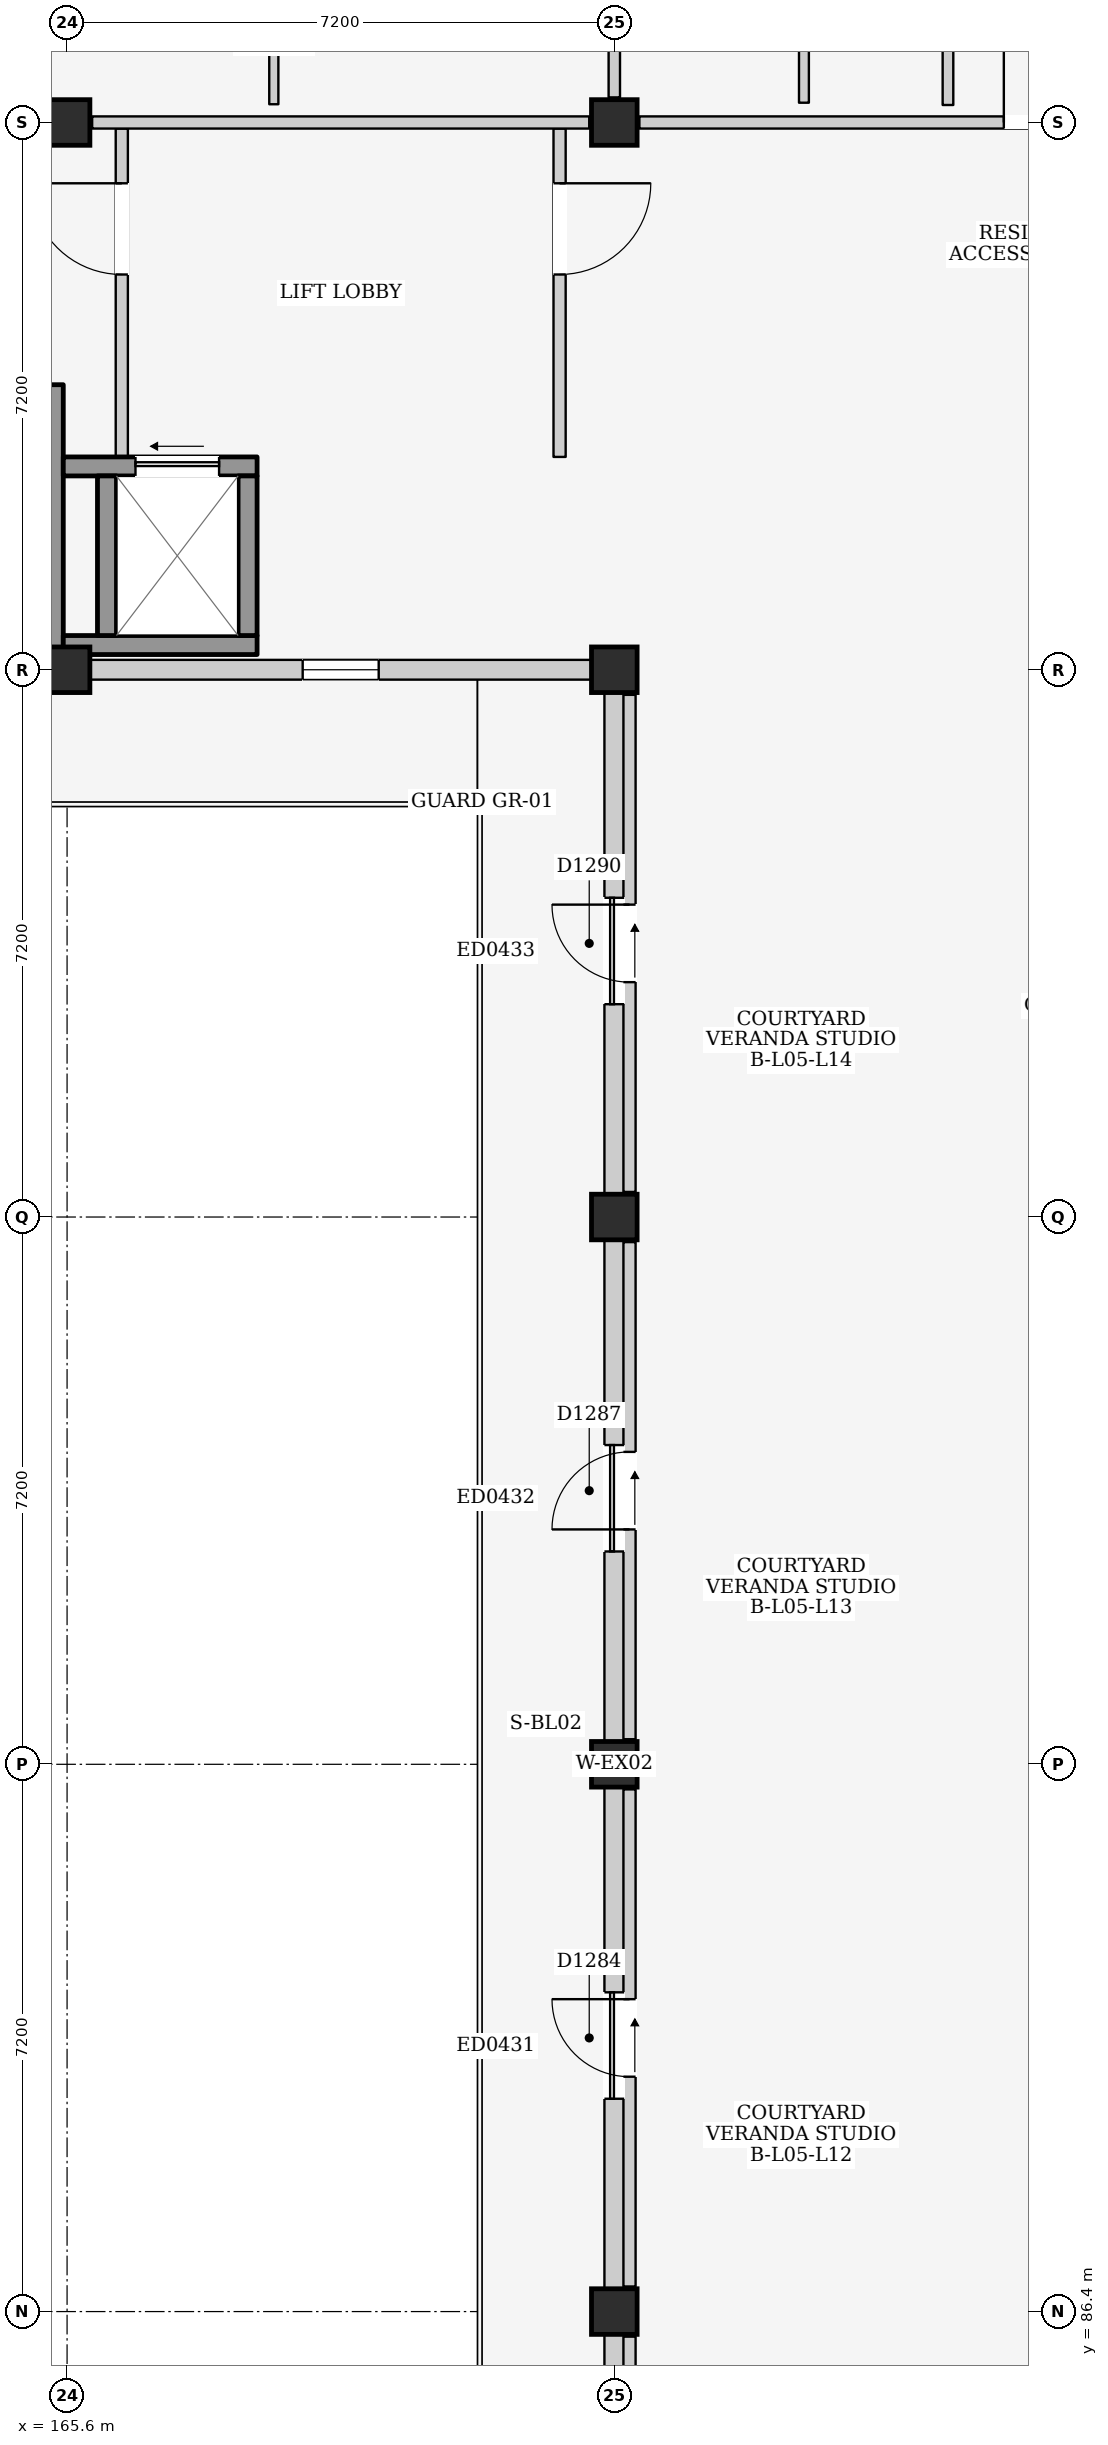
"""IFC4 building model, lengths in metres.
Left out: names, types, materials, properties, quantities, classifications, styles, units other than length and angle.
Written with IfcOpenShell. Run it as: python <this file> out.ifc"""

import sys

from ifc_helpers import new_model, si_unit, direction, frame, frame_2d, origin, origin_2d, place, context, subcontext, project, spatial, rectangle, extrude, element, fill, save


model = new_model("IFC4")
c1 = context("Model", 3, precision=1e-05, world=origin(), true_north=direction((0.0, 1.0)))
c2 = subcontext(c1, "Body", "Model", "MODEL_VIEW")
j1 = project(units=[si_unit("LENGTHUNIT", "METRE"), si_unit("PLANEANGLEUNIT", "RADIAN")], contexts=[c1])
p1 = place(None, origin())
s1 = spatial("IfcSite", under=j1, at=p1, CompositionType="ELEMENT")
p2 = place(p1, origin())
s2 = spatial("IfcBuilding", under=s1, at=p2, CompositionType="ELEMENT")
p3 = place(p2, frame((0.0, 0.0, 18.6)))
s3 = spatial("IfcBuildingStorey", under=s2, at=p3, CompositionType="ELEMENT", Elevation=18.6)
for number, where, z_axis, x_axis in (
    (1, (165.6, 108.0, 0.0), (0.0, 0.0, 1.0), (1.0, 0.0, 0.0)),
    (2, (165.6, 115.2, 0.0), (0.0, 0.0, 1.0), (1.0, 0.0, 0.0)),
    (3, (172.8, 86.4, 0.0), (0.0, 0.0, 1.0), (1.0, 0.0, 0.0)),
    (4, (172.8, 93.6, 0.0), (0.0, 0.0, 1.0), (1.0, 0.0, 0.0)),
    (5, (172.8, 100.8, 0.0), (0.0, 0.0, 1.0), (1.0, 0.0, 0.0)),
    (6, (172.8, 108.0, 0.0), (0.0, 0.0, 1.0), (1.0, 0.0, 0.0)),
    (7, (172.8, 115.2, 0.0), (0.0, 0.0, 1.0), (1.0, 0.0, 0.0)),
):
    element("IfcColumn", number, at=place(p3, frame(where, z_axis=z_axis, x_axis=x_axis)), inside=s3, PredefinedType="COLUMN", context=c2, shape_type="SweptSolid", body=[
        extrude(rectangle(XDim=0.6, YDim=0.6, at=origin_2d()), origin(), (0.0, 0.0, 1.0), 3.3),
    ])
p4 = place(p3, frame((165.9, 108.0, 0.0), z_axis=(0.0, 0.0, 1.0), x_axis=(1.0, 0.0, 0.0)))
e8 = element("IfcWall", 8, at=p4, inside=s3, PredefinedType="ELEMENTEDWALL", context=c2, shape_type="SweptSolid", body=[
    extrude(rectangle(XDim=6.6, YDim=0.26, at=frame_2d((3.3, 0.0))), origin(), (0.0, 0.0, 1.0), 2.445),
])
p5 = place(p4, frame((2.8, 0.0, 1.2)))
e9 = element("IfcOpeningElement", 9, at=p5, cuts=e8, PredefinedType="OPENING", context=c2, shape_type="SweptSolid", body=[
    extrude(rectangle(XDim=1.0, YDim=0.9, at=frame_2d((0.5, 0.45))), frame((0.0, 0.145, 0.0), z_axis=(0.0, -1.0, 0.0), x_axis=(1.0, 0.0, 0.0)), (0.0, 0.0, 1.0), 0.29),
])
p6 = place(p3, frame((172.8, 79.5, 0.0), z_axis=(0.0, 0.0, 1.0), x_axis=(0.0, 1.0, 0.0)))
e10 = element("IfcWall", 10, at=p6, inside=s3, PredefinedType="ELEMENTEDWALL", context=c2, shape_type="SweptSolid", body=[
    extrude(rectangle(XDim=6.6, YDim=0.26, at=frame_2d((3.3, 0.0))), origin(), (0.0, 0.0, 1.0), 2.545),
])
p7 = place(p6, frame((2.5, 0.0, 0.0)))
e11 = element("IfcOpeningElement", 11, at=p7, cuts=e10, PredefinedType="OPENING", context=c2, shape_type="SweptSolid", body=[
    extrude(rectangle(XDim=1.4, YDim=2.1, at=frame_2d((0.7, 1.05))), frame((0.0, 0.145, 0.0), z_axis=(0.0, -1.0, 0.0), x_axis=(1.0, 0.0, 0.0)), (0.0, 0.0, 1.0), 0.29),
])
p8 = place(p3, frame((172.8, 86.7, 0.0), z_axis=(0.0, 0.0, 1.0), x_axis=(0.0, 1.0, 0.0)))
e12 = element("IfcWall", 12, at=p8, inside=s3, PredefinedType="ELEMENTEDWALL", context=c2, shape_type="SweptSolid", body=[
    extrude(rectangle(XDim=6.6, YDim=0.26, at=frame_2d((3.3, 0.0))), origin(), (0.0, 0.0, 1.0), 2.545),
])
p9 = place(p8, frame((2.5, 0.0, 0.0)))
e13 = element("IfcOpeningElement", 13, at=p9, cuts=e12, PredefinedType="OPENING", context=c2, shape_type="SweptSolid", body=[
    extrude(rectangle(XDim=1.4, YDim=2.1, at=frame_2d((0.7, 1.05))), frame((0.0, 0.145, 0.0), z_axis=(0.0, -1.0, 0.0), x_axis=(1.0, 0.0, 0.0)), (0.0, 0.0, 1.0), 0.29),
])
p10 = place(p3, frame((172.8, 93.9, 0.0), z_axis=(0.0, 0.0, 1.0), x_axis=(0.0, 1.0, 0.0)))
e14 = element("IfcWall", 14, at=p10, inside=s3, PredefinedType="ELEMENTEDWALL", context=c2, shape_type="SweptSolid", body=[
    extrude(rectangle(XDim=6.6, YDim=0.26, at=frame_2d((3.3, 0.0))), origin(), (0.0, 0.0, 1.0), 2.545),
])
p11 = place(p10, frame((2.5, 0.0, 0.0)))
e15 = element("IfcOpeningElement", 15, at=p11, cuts=e14, PredefinedType="OPENING", context=c2, shape_type="SweptSolid", body=[
    extrude(rectangle(XDim=1.4, YDim=2.1, at=frame_2d((0.7, 1.05))), frame((0.0, 0.145, 0.0), z_axis=(0.0, -1.0, 0.0), x_axis=(1.0, 0.0, 0.0)), (0.0, 0.0, 1.0), 0.29),
])
p12 = place(p3, frame((172.8, 101.1, 0.0), z_axis=(0.0, 0.0, 1.0), x_axis=(0.0, 1.0, 0.0)))
e16 = element("IfcWall", 16, at=p12, inside=s3, PredefinedType="ELEMENTEDWALL", context=c2, shape_type="SweptSolid", body=[
    extrude(rectangle(XDim=6.6, YDim=0.26, at=frame_2d((3.3, 0.0))), origin(), (0.0, 0.0, 1.0), 2.545),
])
p13 = place(p12, frame((2.5, 0.0, 0.0)))
e17 = element("IfcOpeningElement", 17, at=p13, cuts=e16, PredefinedType="OPENING", context=c2, shape_type="SweptSolid", body=[
    extrude(rectangle(XDim=1.4, YDim=2.1, at=frame_2d((0.7, 1.05))), frame((0.0, 0.145, 0.0), z_axis=(0.0, -1.0, 0.0), x_axis=(1.0, 0.0, 0.0)), (0.0, 0.0, 1.0), 0.29),
])
p14 = place(p3, frame((165.4, 108.15, 0.0), z_axis=(0.0, 0.0, 1.0), x_axis=(0.0, 1.0, 0.0)))
e18 = element("IfcWall", 18, at=p14, inside=s3, PredefinedType="SHEAR", context=c2, shape_type="SweptSolid", body=[
    extrude(rectangle(XDim=3.6, YDim=0.3, at=frame_2d((1.8, 0.0))), origin(), (0.0, 0.0, 1.0), 3.06),
])
p15 = place(p3, frame((166.32, 110.8, 0.0), z_axis=(0.0, 0.0, 1.0), x_axis=(0.0, 1.0, 0.0)))
e19 = element("IfcWall", 19, at=p15, inside=s3, PredefinedType="PARTITIONING", context=c2, shape_type="SweptSolid", body=[
    extrude(rectangle(XDim=4.32, YDim=0.16, at=frame_2d((2.16, 0.0))), origin(), (0.0, 0.0, 1.0), 3.06),
])
p16 = place(p15, frame((2.4, 0.0, 0.0)))
e20 = element("IfcOpeningElement", 20, at=p16, cuts=e19, PredefinedType="OPENING", context=c2, shape_type="SweptSolid", body=[
    extrude(rectangle(XDim=1.2, YDim=2.2, at=frame_2d((0.6, 1.1))), frame((0.0, 0.095, 0.0), z_axis=(0.0, -1.0, 0.0), x_axis=(1.0, 0.0, 0.0)), (0.0, 0.0, 1.0), 0.19),
])
p17 = place(p3, frame((172.08, 110.8, 0.0), z_axis=(0.0, 0.0, 1.0), x_axis=(0.0, 1.0, 0.0)))
e21 = element("IfcWall", 21, at=p17, inside=s3, PredefinedType="PARTITIONING", context=c2, shape_type="SweptSolid", body=[
    extrude(rectangle(XDim=4.32, YDim=0.16, at=frame_2d((2.16, 0.0))), origin(), (0.0, 0.0, 1.0), 3.06),
])
p18 = place(p17, frame((2.4, 0.0, 0.0)))
e22 = element("IfcOpeningElement", 22, at=p18, cuts=e21, PredefinedType="OPENING", context=c2, shape_type="SweptSolid", body=[
    extrude(rectangle(XDim=1.2, YDim=2.2, at=frame_2d((0.6, 1.1))), frame((0.0, 0.095, 0.0), z_axis=(0.0, -1.0, 0.0), x_axis=(1.0, 0.0, 0.0)), (0.0, 0.0, 1.0), 0.19),
])
p19 = place(p3, frame((165.55, 108.325, 0.0), z_axis=(0.0, 0.0, 1.0), x_axis=(1.0, 0.0, 0.0)))
e23 = element("IfcWall", 23, at=p19, inside=s3, PredefinedType="SHEAR", context=c2, shape_type="SweptSolid", body=[
    extrude(rectangle(XDim=2.55, YDim=0.25, at=frame_2d((1.275, 0.0))), origin(), (0.0, 0.0, 1.0), 3.06),
])
p20 = place(p3, frame((165.55, 110.675, 0.0), z_axis=(0.0, 0.0, 1.0), x_axis=(1.0, 0.0, 0.0)))
e24 = element("IfcWall", 24, at=p20, inside=s3, PredefinedType="SHEAR", context=c2, shape_type="SweptSolid", body=[
    extrude(rectangle(XDim=2.55, YDim=0.25, at=frame_2d((1.275, 0.0))), origin(), (0.0, 0.0, 1.0), 3.06),
])
p21 = place(p20, frame((0.95, 0.0, 0.0)))
e25 = element("IfcOpeningElement", 25, at=p21, cuts=e24, PredefinedType="OPENING", context=c2, shape_type="SweptSolid", body=[
    extrude(rectangle(XDim=1.1, YDim=2.15, at=frame_2d((0.55, 1.075))), frame((0.0, 0.14, 0.0), z_axis=(0.0, -1.0, 0.0), x_axis=(1.0, 0.0, 0.0)), (0.0, 0.0, 1.0), 0.28),
])
for number, where, z_axis, x_axis in (
    (26, (166.125, 108.45, 0.0), (0.0, 0.0, 1.0), (0.0, 1.0, 0.0)),
    (27, (167.975, 108.45, 0.0), (0.0, 0.0, 1.0), (0.0, 1.0, 0.0)),
):
    element("IfcWall", number, at=place(p3, frame(where, z_axis=z_axis, x_axis=x_axis)), inside=s3, PredefinedType="SHEAR", context=c2, shape_type="SweptSolid", body=[
        extrude(rectangle(XDim=2.1, YDim=0.25, at=frame_2d((1.05, 0.0))), origin(), (0.0, 0.0, 1.0), 3.06),
    ])
p22 = place(p3, frame((165.93, 115.2, 0.0), z_axis=(0.0, 0.0, 1.0), x_axis=(1.0, 0.0, 0.0)))
e28 = element("IfcWall", 28, at=p22, inside=s3, PredefinedType="PARTITIONING", context=c2, shape_type="SweptSolid", body=[
    extrude(rectangle(XDim=6.54, YDim=0.16, at=frame_2d((3.27, 0.0))), origin(), (0.0, 0.0, 1.0), 2.445),
])
p23 = place(p3, frame((172.8, 115.53, 0.0), z_axis=(0.0, 0.0, 1.0), x_axis=(0.0, 1.0, 0.0)))
e29 = element("IfcWall", 29, at=p23, inside=s3, PredefinedType="PARTITIONING", context=c2, shape_type="SweptSolid", body=[
    extrude(rectangle(XDim=6.54, YDim=0.15, at=frame_2d((3.27, 0.0))), origin(), (0.0, 0.0, 1.0), 2.545),
])
p24 = place(p3, frame((168.32, 115.44, 0.0), z_axis=(0.0, 0.0, 1.0), x_axis=(0.0, 1.0, 0.0)))
e30 = element("IfcWall", 30, at=p24, inside=s3, PredefinedType="PARTITIONING", context=c2, shape_type="SweptSolid", body=[
    extrude(rectangle(XDim=3.04, YDim=0.12, at=frame_2d((1.52, 0.0))), origin(), (0.0, 0.0, 1.0), 3.06),
])
p25 = place(p24, frame((1.04, 0.0, 0.0)))
e31 = element("IfcOpeningElement", 31, at=p25, cuts=e30, PredefinedType="OPENING", context=c2, shape_type="SweptSolid", body=[
    extrude(rectangle(XDim=0.96, YDim=2.15, at=frame_2d((0.48, 1.075))), frame((0.0, 0.075, 0.0), z_axis=(0.0, -1.0, 0.0), x_axis=(1.0, 0.0, 0.0)), (0.0, 0.0, 1.0), 0.15),
])
p26 = place(p3, frame((173.13, 115.2, 0.0), z_axis=(0.0, 0.0, 1.0), x_axis=(1.0, 0.0, 0.0)))
e32 = element("IfcWall", 32, at=p26, inside=s3, PredefinedType="PARTITIONING", context=c2, shape_type="SweptSolid", body=[
    extrude(rectangle(XDim=6.54, YDim=0.16, at=frame_2d((3.27, 0.0))), origin(), (0.0, 0.0, 1.0), 2.445),
])
p27 = place(p26, frame((4.795, 0.0, 0.0)))
e33 = element("IfcOpeningElement", 33, at=p27, cuts=e32, PredefinedType="OPENING", context=c2, shape_type="SweptSolid", body=[
    extrude(rectangle(XDim=1.05, YDim=2.15, at=frame_2d((0.525, 1.075))), frame((0.0, 0.095, 0.0), z_axis=(0.0, -1.0, 0.0), x_axis=(1.0, 0.0, 0.0)), (0.0, 0.0, 1.0), 0.19),
])
p28 = place(p3, frame((175.295, 115.46, 0.0), z_axis=(0.0, 0.0, 1.0), x_axis=(0.0, 1.0, 0.0)))
e34 = element("IfcWall", 34, at=p28, inside=s3, PredefinedType="PARTITIONING", context=c2, shape_type="SweptSolid", body=[
    extrude(rectangle(XDim=2.33, YDim=0.13, at=frame_2d((1.165, 0.0))), origin(), (0.0, 0.0, 1.0), 3.06),
])
p29 = place(p3, frame((177.19, 115.43, 0.0), z_axis=(0.0, 0.0, 1.0), x_axis=(0.0, 1.0, 0.0)))
e35 = element("IfcWall", 35, at=p29, inside=s3, PredefinedType="PARTITIONING", context=c2, shape_type="SweptSolid", body=[
    extrude(rectangle(XDim=2.35, YDim=0.14, at=frame_2d((1.175, 0.0))), origin(), (0.0, 0.0, 1.0), 3.06),
])
p30 = place(p3, frame((173.0, 79.53, 0.0), z_axis=(0.0, 0.0, 1.0), x_axis=(0.0, 1.0, 0.0)))
e36 = element("IfcWall", 36, at=p30, inside=s3, PredefinedType="PARTITIONING", context=c2, shape_type="SweptSolid", body=[
    extrude(rectangle(XDim=6.54, YDim=0.16, at=frame_2d((3.27, 0.0))), origin(), (0.0, 0.0, 1.0), 3.06),
])
p31 = place(p30, frame((2.76, 0.0, 0.0)))
e37 = element("IfcOpeningElement", 37, at=p31, cuts=e36, PredefinedType="OPENING", context=c2, shape_type="SweptSolid", body=[
    extrude(rectangle(XDim=1.02, YDim=2.18, at=frame_2d((0.51, 1.09))), frame((0.0, 0.095, 0.0), z_axis=(0.0, -1.0, 0.0), x_axis=(1.0, 0.0, 0.0)), (0.0, 0.0, 1.0), 0.19),
])
p32 = place(p3, frame((173.0, 86.73, 0.0), z_axis=(0.0, 0.0, 1.0), x_axis=(0.0, 1.0, 0.0)))
e38 = element("IfcWall", 38, at=p32, inside=s3, PredefinedType="PARTITIONING", context=c2, shape_type="SweptSolid", body=[
    extrude(rectangle(XDim=6.54, YDim=0.16, at=frame_2d((3.27, 0.0))), origin(), (0.0, 0.0, 1.0), 3.06),
])
p33 = place(p32, frame((2.76, 0.0, 0.0)))
e39 = element("IfcOpeningElement", 39, at=p33, cuts=e38, PredefinedType="OPENING", context=c2, shape_type="SweptSolid", body=[
    extrude(rectangle(XDim=1.02, YDim=2.18, at=frame_2d((0.51, 1.09))), frame((0.0, 0.095, 0.0), z_axis=(0.0, -1.0, 0.0), x_axis=(1.0, 0.0, 0.0)), (0.0, 0.0, 1.0), 0.19),
])
p34 = place(p3, frame((173.0, 93.93, 0.0), z_axis=(0.0, 0.0, 1.0), x_axis=(0.0, 1.0, 0.0)))
e40 = element("IfcWall", 40, at=p34, inside=s3, PredefinedType="PARTITIONING", context=c2, shape_type="SweptSolid", body=[
    extrude(rectangle(XDim=6.54, YDim=0.16, at=frame_2d((3.27, 0.0))), origin(), (0.0, 0.0, 1.0), 3.06),
])
p35 = place(p34, frame((2.76, 0.0, 0.0)))
e41 = element("IfcOpeningElement", 41, at=p35, cuts=e40, PredefinedType="OPENING", context=c2, shape_type="SweptSolid", body=[
    extrude(rectangle(XDim=1.02, YDim=2.18, at=frame_2d((0.51, 1.09))), frame((0.0, 0.095, 0.0), z_axis=(0.0, -1.0, 0.0), x_axis=(1.0, 0.0, 0.0)), (0.0, 0.0, 1.0), 0.19),
])
p36 = place(p3, frame((173.0, 101.13, 0.0), z_axis=(0.0, 0.0, 1.0), x_axis=(0.0, 1.0, 0.0)))
e42 = element("IfcWall", 42, at=p36, inside=s3, PredefinedType="PARTITIONING", context=c2, shape_type="SweptSolid", body=[
    extrude(rectangle(XDim=6.54, YDim=0.16, at=frame_2d((3.27, 0.0))), origin(), (0.0, 0.0, 1.0), 3.06),
])
p37 = place(p36, frame((2.76, 0.0, 0.0)))
e43 = element("IfcOpeningElement", 43, at=p37, cuts=e42, PredefinedType="OPENING", context=c2, shape_type="SweptSolid", body=[
    extrude(rectangle(XDim=1.02, YDim=2.18, at=frame_2d((0.51, 1.09))), frame((0.0, 0.095, 0.0), z_axis=(0.0, -1.0, 0.0), x_axis=(1.0, 0.0, 0.0)), (0.0, 0.0, 1.0), 0.19),
])
p38 = place(p5, origin())
e44 = element("IfcWindow", 44, at=p38, inside=s3, PartitioningType="SINGLE_PANEL", PredefinedType="WINDOW", context=c2, shape_type="SweptSolid", body=[
    extrude(rectangle(XDim=1.0, YDim=0.9, at=frame_2d((0.5, 0.45))), frame((0.0, 0.03, 0.0), z_axis=(0.0, -1.0, 0.0), x_axis=(1.0, 0.0, 0.0)), (0.0, 0.0, 1.0), 0.06),
])
fill(e9, e44)
p39 = place(p9, frame((1.4, 0.0, 0.0), z_axis=(0.0, 0.0, 1.0), x_axis=(-1.0, 0.0, 0.0)))
e45 = element("IfcDoor", 45, at=p39, inside=s3, OperationType="SLIDING_TO_RIGHT", PredefinedType="DOOR", context=c2, shape_type="SweptSolid", body=[
    extrude(rectangle(XDim=1.4, YDim=2.1, at=frame_2d((0.7, 1.05))), frame((0.0, 0.025, 0.0), z_axis=(0.0, -1.0, 0.0), x_axis=(1.0, 0.0, 0.0)), (0.0, 0.0, 1.0), 0.05),
])
fill(e13, e45)
p40 = place(p11, frame((1.4, 0.0, 0.0), z_axis=(0.0, 0.0, 1.0), x_axis=(-1.0, 0.0, 0.0)))
e46 = element("IfcDoor", 46, at=p40, inside=s3, OperationType="SLIDING_TO_RIGHT", PredefinedType="DOOR", context=c2, shape_type="SweptSolid", body=[
    extrude(rectangle(XDim=1.4, YDim=2.1, at=frame_2d((0.7, 1.05))), frame((0.0, 0.025, 0.0), z_axis=(0.0, -1.0, 0.0), x_axis=(1.0, 0.0, 0.0)), (0.0, 0.0, 1.0), 0.05),
])
fill(e15, e46)
p41 = place(p13, frame((1.4, 0.0, 0.0), z_axis=(0.0, 0.0, 1.0), x_axis=(-1.0, 0.0, 0.0)))
e47 = element("IfcDoor", 47, at=p41, inside=s3, OperationType="SLIDING_TO_RIGHT", PredefinedType="DOOR", context=c2, shape_type="SweptSolid", body=[
    extrude(rectangle(XDim=1.4, YDim=2.1, at=frame_2d((0.7, 1.05))), frame((0.0, 0.025, 0.0), z_axis=(0.0, -1.0, 0.0), x_axis=(1.0, 0.0, 0.0)), (0.0, 0.0, 1.0), 0.05),
])
fill(e17, e47)
p42 = place(p16, origin())
e48 = element("IfcDoor", 48, at=p42, inside=s3, OperationType="SINGLE_SWING_RIGHT", PredefinedType="DOOR", context=c2, shape_type="SweptSolid", body=[
    extrude(rectangle(XDim=1.2, YDim=2.2, at=frame_2d((0.6, 1.1))), frame((0.0, 0.025, 0.0), z_axis=(0.0, -1.0, 0.0), x_axis=(1.0, 0.0, 0.0)), (0.0, 0.0, 1.0), 0.05),
])
fill(e20, e48)
p43 = place(p18, frame((1.2, 0.0, 0.0), z_axis=(0.0, 0.0, 1.0), x_axis=(-1.0, 0.0, 0.0)))
e49 = element("IfcDoor", 49, at=p43, inside=s3, OperationType="SINGLE_SWING_LEFT", PredefinedType="DOOR", context=c2, shape_type="SweptSolid", body=[
    extrude(rectangle(XDim=1.2, YDim=2.2, at=frame_2d((0.6, 1.1))), frame((0.0, 0.025, 0.0), z_axis=(0.0, -1.0, 0.0), x_axis=(1.0, 0.0, 0.0)), (0.0, 0.0, 1.0), 0.05),
])
fill(e22, e49)
p44 = place(p21, origin())
e50 = element("IfcDoor", 50, at=p44, inside=s3, OperationType="SLIDING_TO_LEFT", PredefinedType="DOOR", context=c2, shape_type="SweptSolid", body=[
    extrude(rectangle(XDim=1.1, YDim=2.15, at=frame_2d((0.55, 1.075))), frame((0.0, 0.025, 0.0), z_axis=(0.0, -1.0, 0.0), x_axis=(1.0, 0.0, 0.0)), (0.0, 0.0, 1.0), 0.05),
])
fill(e25, e50)
p45 = place(p27, origin())
e51 = element("IfcDoor", 51, at=p45, inside=s3, OperationType="SINGLE_SWING_LEFT", PredefinedType="DOOR", context=c2, shape_type="SweptSolid", body=[
    extrude(rectangle(XDim=1.05, YDim=2.15, at=frame_2d((0.525, 1.075))), frame((0.0, 0.025, 0.0), z_axis=(0.0, -1.0, 0.0), x_axis=(1.0, 0.0, 0.0)), (0.0, 0.0, 1.0), 0.05),
])
fill(e33, e51)
p46 = place(p33, origin())
e52 = element("IfcDoor", 52, at=p46, inside=s3, OperationType="SINGLE_SWING_RIGHT", PredefinedType="DOOR", context=c2, shape_type="SweptSolid", body=[
    extrude(rectangle(XDim=1.02, YDim=2.18, at=frame_2d((0.51, 1.09))), frame((0.0, 0.025, 0.0), z_axis=(0.0, -1.0, 0.0), x_axis=(1.0, 0.0, 0.0)), (0.0, 0.0, 1.0), 0.05),
])
fill(e39, e52)
p47 = place(p35, origin())
e53 = element("IfcDoor", 53, at=p47, inside=s3, OperationType="SINGLE_SWING_LEFT", PredefinedType="DOOR", context=c2, shape_type="SweptSolid", body=[
    extrude(rectangle(XDim=1.02, YDim=2.18, at=frame_2d((0.51, 1.09))), frame((0.0, 0.025, 0.0), z_axis=(0.0, -1.0, 0.0), x_axis=(1.0, 0.0, 0.0)), (0.0, 0.0, 1.0), 0.05),
])
fill(e41, e53)
p48 = place(p37, origin())
e54 = element("IfcDoor", 54, at=p48, inside=s3, OperationType="SINGLE_SWING_RIGHT", PredefinedType="DOOR", context=c2, shape_type="SweptSolid", body=[
    extrude(rectangle(XDim=1.02, YDim=2.18, at=frame_2d((0.51, 1.09))), frame((0.0, 0.025, 0.0), z_axis=(0.0, -1.0, 0.0), x_axis=(1.0, 0.0, 0.0)), (0.0, 0.0, 1.0), 0.05),
])
fill(e43, e54)
save(model, sys.argv[1])
